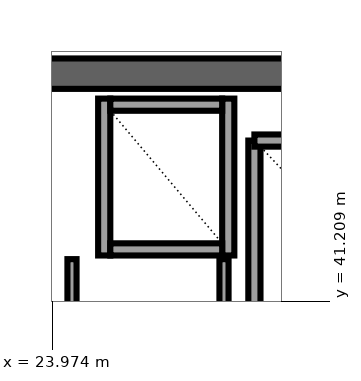
"""IFC4 building model, lengths in metres.
Left out: names, types, materials, properties, quantities, classifications, styles, units other than length and angle.
Written with IfcOpenShell. Run it as: python <this file> out.ifc"""

import sys

from ifc_helpers import new_model, si_unit, direction, frame, frame_2d, origin, place, context, subcontext, project, spatial, rectangle, extrude, element, save


model = new_model("IFC4")
c1 = context("Model", 3, precision=1e-05, world=origin(), true_north=direction((0.0, 1.0)))
c2 = subcontext(c1, "Body", "Model", "MODEL_VIEW")
j1 = project(units=[si_unit("LENGTHUNIT", "METRE"), si_unit("PLANEANGLEUNIT", "RADIAN")], contexts=[c1])
p1 = place(None, origin())
s1 = spatial("IfcSite", under=j1, at=p1, CompositionType="ELEMENT")
p2 = place(p1, origin())
s2 = spatial("IfcBuilding", under=s1, at=p2, CompositionType="ELEMENT")
p3 = place(p2, frame((0.0, 0.0, 245.2)))
s3 = spatial("IfcBuildingStorey", under=s2, at=p3, CompositionType="ELEMENT", Elevation=245.2)
p4 = place(p3, frame((10.0, 44.95, 0.0), z_axis=(0.0, 0.0, 1.0), x_axis=(1.0, 0.0, 0.0)))
e1 = element("IfcWall", 1, at=p4, inside=s3, PredefinedType="SHEAR", context=c2, shape_type="SweptSolid", body=[
    extrude(rectangle(XDim=26.0, YDim=0.5, at=frame_2d((13.0, 0.0))), origin(), (0.0, 0.0, 1.0), 3.55),
])
p5 = place(p3, frame((27.3, 39.45, 0.0), z_axis=(0.0, 0.0, 1.0), x_axis=(0.0, 1.0, 0.0)))
e2 = element("IfcWall", 2, at=p5, inside=s3, PredefinedType="SOLIDWALL", context=c2, shape_type="SweptSolid", body=[
    extrude(rectangle(XDim=4.4, YDim=0.2, at=frame_2d((2.2, 0.0))), origin(), (0.0, 0.0, 1.0), 3.37),
])
p6 = place(p3, frame((27.3, 43.85, 0.0), z_axis=(0.0, 0.0, 1.0), x_axis=(1.0, 0.0, 0.0)))
e3 = element("IfcWall", 3, at=p6, inside=s3, PredefinedType="SOLIDWALL", context=c2, shape_type="SweptSolid", body=[
    extrude(rectangle(XDim=4.1, YDim=0.2, at=frame_2d((2.05, 0.0))), origin(), (0.0, 0.0, 1.0), 3.37),
])
for number, where, z_axis, x_axis in (
    (4, (24.83, 41.96, 0.0), (0.0, 0.0, 1.0), (0.0, 1.0, 0.0)),
    (5, (26.87, 41.96, 0.0), (0.0, 0.0, 1.0), (0.0, 1.0, 0.0)),
):
    element("IfcWall", number, at=place(p3, frame(where, z_axis=z_axis, x_axis=x_axis)), inside=s3, PredefinedType="SOLIDWALL", context=c2, shape_type="SweptSolid", body=[
        extrude(rectangle(XDim=2.58, YDim=0.2, at=frame_2d((1.29, 0.0))), origin(), (0.0, 0.0, 1.0), 3.37),
    ])
for number, where, z_axis, x_axis in (
    (6, (24.93, 42.06, 0.0), (0.0, 0.0, 1.0), (1.0, 0.0, 0.0)),
    (7, (24.93, 44.44, 0.0), (0.0, 0.0, 1.0), (1.0, 0.0, 0.0)),
):
    element("IfcWall", number, at=place(p3, frame(where, z_axis=z_axis, x_axis=x_axis)), inside=s3, PredefinedType="SOLIDWALL", context=c2, shape_type="SweptSolid", body=[
        extrude(rectangle(XDim=1.84, YDim=0.2, at=frame_2d((0.92, 0.0))), origin(), (0.0, 0.0, 1.0), 3.37),
    ])
p7 = place(p3, frame((24.3, 37.05, 0.0), z_axis=(0.0, 0.0, 1.0), x_axis=(0.0, 1.0, 0.0)))
e8 = element("IfcWall", 8, at=p7, inside=s3, PredefinedType="PARTITIONING", context=c2, shape_type="SweptSolid", body=[
    extrude(rectangle(XDim=4.85, YDim=0.15, at=frame_2d((2.425, 0.0))), origin(), (0.0, 0.0, 1.0), 3.37),
])
p8 = place(p7, frame((2.015, 0.0, 0.0)))
e9 = element("IfcOpeningElement", 9, at=p8, cuts=e8, PredefinedType="OPENING", context=c2, shape_type="SweptSolid", body=[
    extrude(rectangle(XDim=0.82, YDim=2.01, at=frame_2d((0.41, 1.005))), frame((0.0, 0.085, 0.0), z_axis=(0.0, -1.0, 0.0), x_axis=(1.0, 0.0, 0.0)), (0.0, 0.0, 1.0), 0.17),
])
p9 = place(p3, frame((26.8, 37.04, 0.0), z_axis=(0.0, 0.0, 1.0), x_axis=(0.0, 1.0, 0.0)))
e10 = element("IfcWall", 10, at=p9, inside=s3, PredefinedType="PARTITIONING", context=c2, shape_type="SweptSolid", body=[
    extrude(rectangle(XDim=4.86, YDim=0.15, at=frame_2d((2.43, 0.0))), origin(), (0.0, 0.0, 1.0), 3.37),
])
save(model, sys.argv[1])
